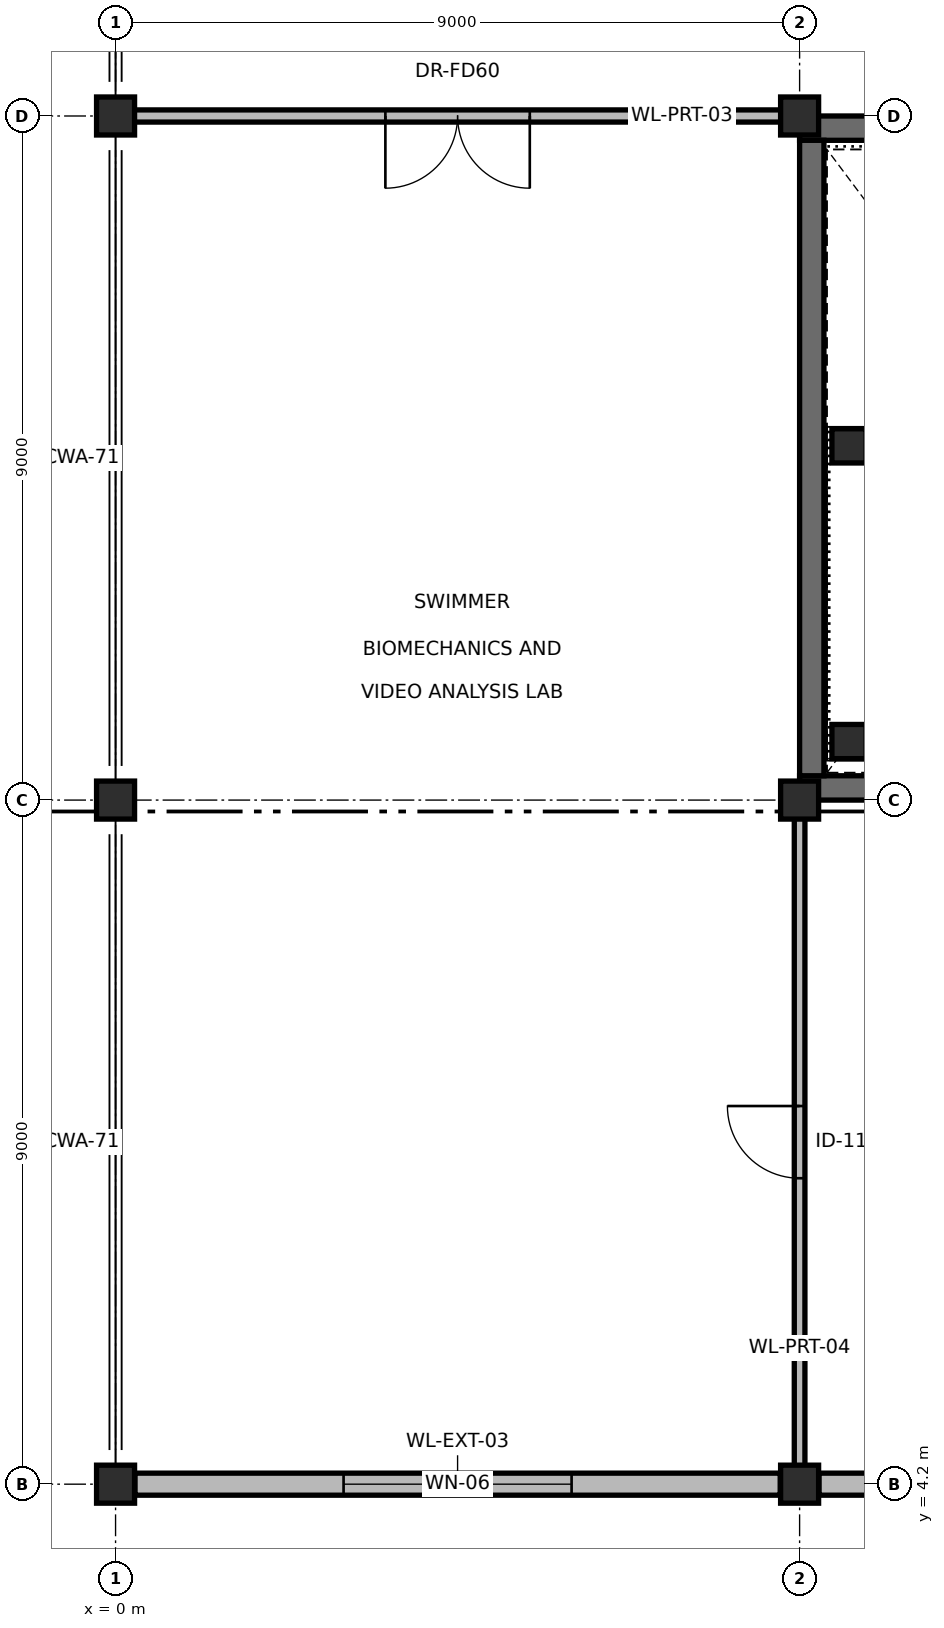
"""IFC4 building model, lengths in metres.
Left out: names, types, materials, properties, quantities, classifications, styles, units other than length and angle.
Written with IfcOpenShell. Run it as: python <this file> out.ifc"""

import sys

from ifc_helpers import new_model, si_unit, direction, frame, frame_2d, origin, origin_2d, place, context, subcontext, project, spatial, rectangle, extrude, element, fill, save


model = new_model("IFC4")
c1 = context("Model", 3, precision=1e-05, world=origin(), true_north=direction((0.0, 1.0)))
c2 = subcontext(c1, "Body", "Model", "MODEL_VIEW")
j1 = project(units=[si_unit("LENGTHUNIT", "METRE"), si_unit("PLANEANGLEUNIT", "RADIAN")], contexts=[c1])
p1 = place(None, origin())
s1 = spatial("IfcSite", under=j1, at=p1, CompositionType="ELEMENT")
p2 = place(p1, origin())
s2 = spatial("IfcBuilding", under=s1, at=p2, CompositionType="ELEMENT")
p3 = place(p2, frame((0.0, 0.0, 14.1)))
s3 = spatial("IfcBuildingStorey", under=s2, at=p3, CompositionType="ELEMENT", Elevation=14.1)
for number, where, z_axis, x_axis in (
    (1, (0.0, 4.2, 0.0), (0.0, 0.0, 1.0), (1.0, 0.0, 0.0)),
    (2, (0.0, 13.2, 0.0), (0.0, 0.0, 1.0), (1.0, 0.0, 0.0)),
    (3, (0.0, 22.2, 0.0), (0.0, 0.0, 1.0), (1.0, 0.0, 0.0)),
    (4, (9.0, 4.2, 0.0), (0.0, 0.0, 1.0), (1.0, 0.0, 0.0)),
    (5, (9.0, 13.2, 0.0), (0.0, 0.0, 1.0), (1.0, 0.0, 0.0)),
    (6, (9.0, 22.2, 0.0), (0.0, 0.0, 1.0), (1.0, 0.0, 0.0)),
):
    element("IfcColumn", number, at=place(p3, frame(where, z_axis=z_axis, x_axis=x_axis)), inside=s3, PredefinedType="COLUMN", context=c2, shape_type="SweptSolid", body=[
        extrude(rectangle(XDim=0.5, YDim=0.5, at=origin_2d()), origin(), (0.0, 0.0, 1.0), 4.5),
    ])
p4 = place(p3, frame((9.0, 13.36, 0.0), z_axis=(0.0, 0.0, 1.0), x_axis=(1.0, 0.0, 0.0)))
e7 = element("IfcWall", 7, at=p4, inside=s3, PredefinedType="SHEAR", context=c2, shape_type="SweptSolid", body=[
    extrude(rectangle(XDim=18.0, YDim=0.32, at=frame_2d((9.0, 0.0))), origin(), (0.0, 0.0, 1.0), 4.5),
])
p5 = place(p3, frame((9.0, 22.04, 0.0), z_axis=(0.0, 0.0, 1.0), x_axis=(1.0, 0.0, 0.0)))
e8 = element("IfcWall", 8, at=p5, inside=s3, PredefinedType="SHEAR", context=c2, shape_type="SweptSolid", body=[
    extrude(rectangle(XDim=13.0, YDim=0.32, at=frame_2d((6.5, 0.0))), origin(), (0.0, 0.0, 1.0), 4.5),
])
p6 = place(p3, frame((9.16, 13.52, 0.0), z_axis=(0.0, 0.0, 1.0), x_axis=(0.0, 1.0, 0.0)))
e9 = element("IfcWall", 9, at=p6, inside=s3, PredefinedType="SHEAR", context=c2, shape_type="SweptSolid", body=[
    extrude(rectangle(XDim=8.36, YDim=0.32, at=frame_2d((4.18, 0.0))), origin(), (0.0, 0.0, 1.0), 4.5),
])
p7 = place(p3, frame((8.745, 4.2, 0.0), z_axis=(0.0, 0.0, 1.0), x_axis=(-1.0, 0.0, 0.0)))
e10 = element("IfcWall", 10, at=p7, inside=s3, PredefinedType="SOLIDWALL", context=c2, shape_type="SweptSolid", body=[
    extrude(rectangle(XDim=8.49, YDim=0.29, at=frame_2d((4.245, 0.0))), origin(), (0.0, 0.0, 1.0), 3.535),
])
p8 = place(p7, frame((2.745, 0.0, 0.95)))
e11 = element("IfcOpeningElement", 11, at=p8, cuts=e10, PredefinedType="OPENING", context=c2, shape_type="SweptSolid", body=[
    extrude(rectangle(XDim=3.0, YDim=1.2, at=frame_2d((1.5, 0.6))), frame((0.0, 0.155, 0.0), z_axis=(0.0, -1.0, 0.0), x_axis=(1.0, 0.0, 0.0)), (0.0, 0.0, 1.0), 0.31),
])
p9 = place(p3, frame((17.745, 4.2, 0.0), z_axis=(0.0, 0.0, 1.0), x_axis=(-1.0, 0.0, 0.0)))
e12 = element("IfcWall", 12, at=p9, inside=s3, PredefinedType="SOLIDWALL", context=c2, shape_type="SweptSolid", body=[
    extrude(rectangle(XDim=8.49, YDim=0.29, at=frame_2d((4.245, 0.0))), origin(), (0.0, 0.0, 1.0), 3.535),
])
p10 = place(p9, frame((3.045, 0.0, 0.95)))
e13 = element("IfcOpeningElement", 13, at=p10, cuts=e12, PredefinedType="OPENING", context=c2, shape_type="SweptSolid", body=[
    extrude(rectangle(XDim=2.4, YDim=1.2, at=frame_2d((1.2, 0.6))), frame((0.0, 0.155, 0.0), z_axis=(0.0, -1.0, 0.0), x_axis=(1.0, 0.0, 0.0)), (0.0, 0.0, 1.0), 0.31),
])
p11 = place(p3, frame((0.0, 22.2, 0.0), z_axis=(0.0, 0.0, 1.0), x_axis=(1.0, 0.0, 0.0)))
e14 = element("IfcWall", 14, at=p11, inside=s3, PredefinedType="PARTITIONING", context=c2, shape_type="SweptSolid", body=[
    extrude(rectangle(XDim=9.0, YDim=0.16, at=frame_2d((4.5, 0.0))), origin(), (0.0, 0.0, 1.0), 3.535),
])
p12 = place(p11, frame((3.55, 0.0, 0.0)))
e15 = element("IfcOpeningElement", 15, at=p12, cuts=e14, PredefinedType="OPENING", context=c2, shape_type="SweptSolid", body=[
    extrude(rectangle(XDim=1.9, YDim=2.2, at=frame_2d((0.95, 1.1))), frame((0.0, 0.09, 0.0), z_axis=(0.0, -1.0, 0.0), x_axis=(1.0, 0.0, 0.0)), (0.0, 0.0, 1.0), 0.18),
])
p13 = place(p3, frame((9.0, 4.2, 0.0), z_axis=(0.0, 0.0, 1.0), x_axis=(0.0, 1.0, 0.0)))
e16 = element("IfcWall", 16, at=p13, inside=s3, PredefinedType="PARTITIONING", context=c2, shape_type="SweptSolid", body=[
    extrude(rectangle(XDim=9.0, YDim=0.14, at=frame_2d((4.5, 0.0))), origin(), (0.0, 0.0, 1.0), 3.535),
])
p14 = place(p13, frame((4.025, 0.0, 0.0)))
e17 = element("IfcOpeningElement", 17, at=p14, cuts=e16, PredefinedType="OPENING", context=c2, shape_type="SweptSolid", body=[
    extrude(rectangle(XDim=0.95, YDim=2.1, at=frame_2d((0.475, 1.05))), frame((0.0, 0.08, 0.0), z_axis=(0.0, -1.0, 0.0), x_axis=(1.0, 0.0, 0.0)), (0.0, 0.0, 1.0), 0.16),
])
for number, where, z_axis, x_axis in (
    (18, (9.65, 13.97, 0.0), (0.0, 0.0, 1.0), (1.0, 0.0, 0.0)),
    (19, (9.65, 17.86, 0.0), (0.0, 0.0, 1.0), (1.0, 0.0, 0.0)),
):
    element("IfcColumn", number, at=place(p3, frame(where, z_axis=z_axis, x_axis=x_axis)), inside=s3, PredefinedType="COLUMN", context=c2, shape_type="SweptSolid", body=[
        extrude(rectangle(XDim=0.45, YDim=0.45, at=origin_2d()), origin(), (0.0, 0.0, 1.0), 4.5),
    ])
p15 = place(p8, origin())
e20 = element("IfcWindow", 20, at=p15, inside=s3, PartitioningType="SINGLE_PANEL", PredefinedType="WINDOW", context=c2, shape_type="SweptSolid", body=[
    extrude(rectangle(XDim=3.0, YDim=1.2, at=frame_2d((1.5, 0.6))), frame((0.0, 0.03, 0.0), z_axis=(0.0, -1.0, 0.0), x_axis=(1.0, 0.0, 0.0)), (0.0, 0.0, 1.0), 0.06),
])
fill(e11, e20)
p16 = place(p12, origin())
e21 = element("IfcDoor", 21, at=p16, inside=s3, OperationType="DOUBLE_DOOR_SINGLE_SWING", PredefinedType="DOOR", context=c2, shape_type="SweptSolid", body=[
    extrude(rectangle(XDim=1.9, YDim=2.2, at=frame_2d((0.95, 1.1))), frame((0.0, 0.025, 0.0), z_axis=(0.0, -1.0, 0.0), x_axis=(1.0, 0.0, 0.0)), (0.0, 0.0, 1.0), 0.05),
])
fill(e15, e21)
p17 = place(p14, origin())
e22 = element("IfcDoor", 22, at=p17, inside=s3, OperationType="SINGLE_SWING_RIGHT", PredefinedType="DOOR", context=c2, shape_type="SweptSolid", body=[
    extrude(rectangle(XDim=0.95, YDim=2.1, at=frame_2d((0.475, 1.05))), frame((0.0, 0.025, 0.0), z_axis=(0.0, -1.0, 0.0), x_axis=(1.0, 0.0, 0.0)), (0.0, 0.0, 1.0), 0.05),
])
fill(e17, e22)
save(model, sys.argv[1])
